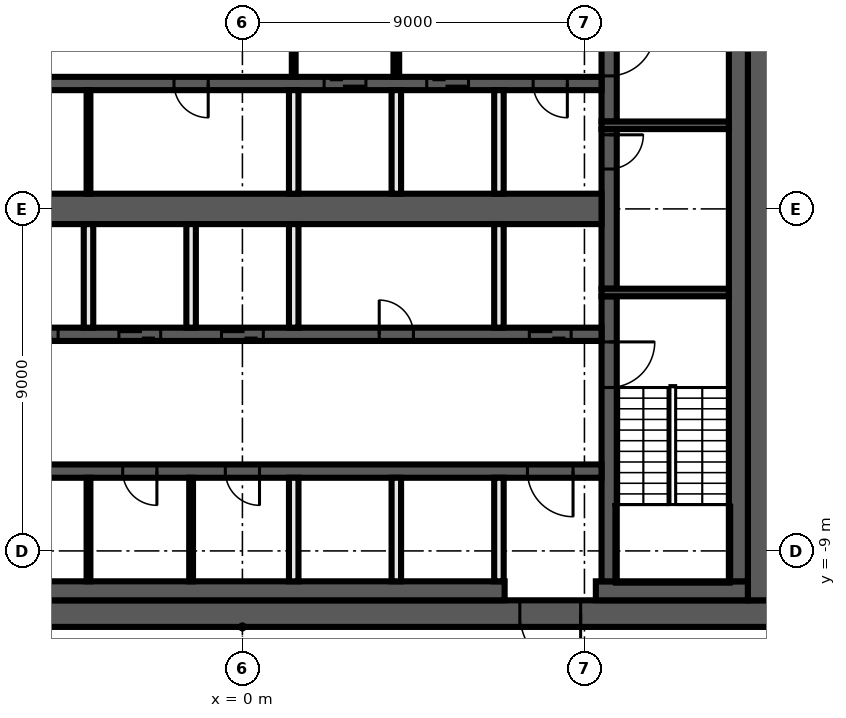
"""IFC4 building model, lengths in metres.
Left out: names, types, materials, properties, quantities, classifications, styles, units other than length and angle.
Written with IfcOpenShell. Run it as: python <this file> out.ifc"""

import sys

from ifc_helpers import new_model, si_unit, direction, frame, frame_2d, origin, place, context, subcontext, project, spatial, rectangle, extrude, element, fill, save


model = new_model("IFC4")
c1 = context("Model", 3, precision=1e-05, world=origin(), true_north=direction((0.0, 1.0)))
c2 = subcontext(c1, "Body", "Model", "MODEL_VIEW")
j1 = project(units=[si_unit("LENGTHUNIT", "METRE"), si_unit("PLANEANGLEUNIT", "RADIAN")], contexts=[c1])
p1 = place(None, origin())
s1 = spatial("IfcSite", under=j1, at=p1, CompositionType="ELEMENT")
p2 = place(p1, origin())
s2 = spatial("IfcBuilding", under=s1, at=p2, CompositionType="ELEMENT")
p3 = place(p2, frame((0.0, 0.0, 249.6)))
s3 = spatial("IfcBuildingStorey", under=s2, at=p3, CompositionType="ELEMENT", Elevation=249.6)
p4 = place(p3, frame((14.0, -10.65, 0.0), z_axis=(0.0, 0.0, 1.0), x_axis=(-1.0, 0.0, 0.0)))
e1 = element("IfcWall", 1, at=p4, inside=s3, PredefinedType="SHEAR", context=c2, shape_type="SweptSolid", body=[
    extrude(rectangle(XDim=28.0, YDim=0.7, at=frame_2d((14.0, 0.0))), origin(), (0.0, 0.0, 1.0), 3.82),
])
p5 = place(p4, frame((5.1, 0.0, 0.0)))
e2 = element("IfcOpeningElement", 2, at=p5, cuts=e1, PredefinedType="OPENING", context=c2, shape_type="SweptSolid", body=[
    extrude(rectangle(XDim=1.6, YDim=2.1, at=frame_2d((0.8, 1.05))), frame((0.0, 0.36, 0.0), z_axis=(0.0, -1.0, 0.0), x_axis=(1.0, 0.0, 0.0)), (0.0, 0.0, 1.0), 0.72),
])
p6 = place(p3, frame((13.65, 10.3, 0.0), z_axis=(0.0, 0.0, 1.0), x_axis=(0.0, -1.0, 0.0)))
e3 = element("IfcWall", 3, at=p6, inside=s3, PredefinedType="SHEAR", context=c2, shape_type="SweptSolid", body=[
    extrude(rectangle(XDim=20.6, YDim=0.7, at=frame_2d((10.3, 0.0))), origin(), (0.0, 0.0, 1.0), 3.82),
])
p7 = place(p3, frame((13.3, -10.05, 0.0), z_axis=(0.0, 0.0, 1.0), x_axis=(-1.0, 0.0, 0.0)))
e4 = element("IfcWall", 4, at=p7, inside=s3, PredefinedType="SHEAR", context=c2, shape_type="SweptSolid", body=[
    extrude(rectangle(XDim=4.0, YDim=0.5, at=frame_2d((2.0, 0.0))), origin(), (0.0, 0.0, 1.0), 3.82),
])
p8 = place(p3, frame((6.9, -10.05, 0.0), z_axis=(0.0, 0.0, 1.0), x_axis=(-1.0, 0.0, 0.0)))
e5 = element("IfcWall", 5, at=p8, inside=s3, PredefinedType="SHEAR", context=c2, shape_type="SweptSolid", body=[
    extrude(rectangle(XDim=20.2, YDim=0.5, at=frame_2d((10.1, 0.0))), origin(), (0.0, 0.0, 1.0), 3.82),
])
p9 = place(p3, frame((13.05, 9.8, 0.0), z_axis=(0.0, 0.0, 1.0), x_axis=(0.0, -1.0, 0.0)))
e6 = element("IfcWall", 6, at=p9, inside=s3, PredefinedType="SHEAR", context=c2, shape_type="SweptSolid", body=[
    extrude(rectangle(XDim=19.6, YDim=0.5, at=frame_2d((9.8, 0.0))), origin(), (0.0, 0.0, 1.0), 3.82),
])
p10 = place(p3, frame((9.65, -2.3, 0.0), z_axis=(0.0, 0.0, 1.0), x_axis=(0.0, -1.0, 0.0)))
e7 = element("IfcWall", 7, at=p10, inside=s3, PredefinedType="SHEAR", context=c2, shape_type="SweptSolid", body=[
    extrude(rectangle(XDim=7.5, YDim=0.4, at=frame_2d((3.75, 0.0))), origin(), (0.0, 0.0, 1.0), 3.82),
])
p11 = place(p10, frame((1.2, 0.0, 0.0)))
e8 = element("IfcOpeningElement", 8, at=p11, cuts=e7, PredefinedType="OPENING", context=c2, shape_type="SweptSolid", body=[
    extrude(rectangle(XDim=1.2, YDim=2.1, at=frame_2d((0.6, 1.05))), frame((0.0, 0.21, 0.0), z_axis=(0.0, -1.0, 0.0), x_axis=(1.0, 0.0, 0.0)), (0.0, 0.0, 1.0), 0.42),
])
p12 = place(p3, frame((9.65, 2.1, 0.0), z_axis=(0.0, 0.0, 1.0), x_axis=(0.0, -1.0, 0.0)))
e9 = element("IfcWall", 9, at=p12, inside=s3, PredefinedType="SHEAR", context=c2, shape_type="SweptSolid", body=[
    extrude(rectangle(XDim=4.2, YDim=0.4, at=frame_2d((2.1, 0.0))), origin(), (0.0, 0.0, 1.0), 3.82),
])
p13 = place(p12, frame((0.15, 0.0, 0.0)))
e10 = element("IfcOpeningElement", 10, at=p13, cuts=e9, PredefinedType="OPENING", context=c2, shape_type="SweptSolid", body=[
    extrude(rectangle(XDim=0.9, YDim=2.1, at=frame_2d((0.45, 1.05))), frame((0.0, 0.21, 0.0), z_axis=(0.0, -1.0, 0.0), x_axis=(1.0, 0.0, 0.0)), (0.0, 0.0, 1.0), 0.42),
])
p14 = place(p3, frame((9.65, 9.8, 0.0), z_axis=(0.0, 0.0, 1.0), x_axis=(0.0, -1.0, 0.0)))
e11 = element("IfcWall", 11, at=p14, inside=s3, PredefinedType="SHEAR", context=c2, shape_type="SweptSolid", body=[
    extrude(rectangle(XDim=7.5, YDim=0.4, at=frame_2d((3.75, 0.0))), origin(), (0.0, 0.0, 1.0), 3.82),
])
p15 = place(p14, frame((5.1, 0.0, 0.0)))
e12 = element("IfcOpeningElement", 12, at=p15, cuts=e11, PredefinedType="OPENING", context=c2, shape_type="SweptSolid", body=[
    extrude(rectangle(XDim=1.2, YDim=2.1, at=frame_2d((0.6, 1.05))), frame((0.0, 0.21, 0.0), z_axis=(0.0, -1.0, 0.0), x_axis=(1.0, 0.0, 0.0)), (0.0, 0.0, 1.0), 0.42),
])
for number, where, z_axis, x_axis in (
    (13, (9.45, 2.2, 0.0), (0.0, 0.0, 1.0), (1.0, 0.0, 0.0)),
    (14, (9.45, -2.2, 0.0), (0.0, 0.0, 1.0), (1.0, 0.0, 0.0)),
):
    element("IfcWall", number, at=place(p3, frame(where, z_axis=z_axis, x_axis=x_axis)), inside=s3, PredefinedType="SHEAR", context=c2, shape_type="SweptSolid", body=[
        extrude(rectangle(XDim=3.35, YDim=0.2, at=frame_2d((1.675, 0.0))), origin(), (0.0, 0.0, 1.0), 3.82),
    ])
p16 = place(p3, frame((9.45, 3.3, 0.0), z_axis=(0.0, 0.0, 1.0), x_axis=(-1.0, 0.0, 0.0)))
e15 = element("IfcWall", 15, at=p16, inside=s3, PredefinedType="SHEAR", context=c2, shape_type="SweptSolid", body=[
    extrude(rectangle(XDim=18.9, YDim=0.35, at=frame_2d((9.45, 0.0))), origin(), (0.0, 0.0, 1.0), 3.82),
])
p17 = place(p16, frame((6.2, 0.0, 0.0)))
e16 = element("IfcOpeningElement", 16, at=p17, cuts=e15, PredefinedType="OPENING", context=c2, shape_type="SweptSolid", body=[
    extrude(rectangle(XDim=1.1, YDim=2.1, at=frame_2d((0.55, 1.05))), frame((0.0, 0.185, 0.0), z_axis=(0.0, -1.0, 0.0), x_axis=(1.0, 0.0, 0.0)), (0.0, 0.0, 1.0), 0.37),
])
p18 = place(p16, frame((3.5, 0.0, 0.0)))
e17 = element("IfcOpeningElement", 17, at=p18, cuts=e15, PredefinedType="OPENING", context=c2, shape_type="SweptSolid", body=[
    extrude(rectangle(XDim=1.1, YDim=2.1, at=frame_2d((0.55, 1.05))), frame((0.0, 0.185, 0.0), z_axis=(0.0, -1.0, 0.0), x_axis=(1.0, 0.0, 0.0)), (0.0, 0.0, 1.0), 0.37),
])
p19 = place(p16, frame((0.9, 0.0, 0.0)))
e18 = element("IfcOpeningElement", 18, at=p19, cuts=e15, PredefinedType="OPENING", context=c2, shape_type="SweptSolid", body=[
    extrude(rectangle(XDim=0.9, YDim=2.1, at=frame_2d((0.45, 1.05))), frame((0.0, 0.185, 0.0), z_axis=(0.0, -1.0, 0.0), x_axis=(1.0, 0.0, 0.0)), (0.0, 0.0, 1.0), 0.37),
])
p20 = place(p16, frame((15.75, 0.0, 0.0)))
e19 = element("IfcOpeningElement", 19, at=p20, cuts=e15, PredefinedType="OPENING", context=c2, shape_type="SweptSolid", body=[
    extrude(rectangle(XDim=0.9, YDim=2.1, at=frame_2d((0.45, 1.05))), frame((0.0, 0.185, 0.0), z_axis=(0.0, -1.0, 0.0), x_axis=(1.0, 0.0, 0.0)), (0.0, 0.0, 1.0), 0.37),
])
p21 = place(p16, frame((10.35, 0.0, 0.0)))
e20 = element("IfcOpeningElement", 20, at=p21, cuts=e15, PredefinedType="OPENING", context=c2, shape_type="SweptSolid", body=[
    extrude(rectangle(XDim=0.9, YDim=2.1, at=frame_2d((0.45, 1.05))), frame((0.0, 0.185, 0.0), z_axis=(0.0, -1.0, 0.0), x_axis=(1.0, 0.0, 0.0)), (0.0, 0.0, 1.0), 0.37),
])
p22 = place(p3, frame((-9.45, -3.3, 0.0), z_axis=(0.0, 0.0, 1.0), x_axis=(1.0, 0.0, 0.0)))
e21 = element("IfcWall", 21, at=p22, inside=s3, PredefinedType="SHEAR", context=c2, shape_type="SweptSolid", body=[
    extrude(rectangle(XDim=18.9, YDim=0.35, at=frame_2d((9.45, 0.0))), origin(), (0.0, 0.0, 1.0), 3.82),
])
p23 = place(p22, frame((0.8, 0.0, 0.0)))
e22 = element("IfcOpeningElement", 22, at=p23, cuts=e21, PredefinedType="OPENING", context=c2, shape_type="SweptSolid", body=[
    extrude(rectangle(XDim=1.1, YDim=2.1, at=frame_2d((0.55, 1.05))), frame((0.0, 0.185, 0.0), z_axis=(0.0, -1.0, 0.0), x_axis=(1.0, 0.0, 0.0)), (0.0, 0.0, 1.0), 0.37),
])
p24 = place(p22, frame((3.5, 0.0, 0.0)))
e23 = element("IfcOpeningElement", 23, at=p24, cuts=e21, PredefinedType="OPENING", context=c2, shape_type="SweptSolid", body=[
    extrude(rectangle(XDim=1.1, YDim=2.1, at=frame_2d((0.55, 1.05))), frame((0.0, 0.185, 0.0), z_axis=(0.0, -1.0, 0.0), x_axis=(1.0, 0.0, 0.0)), (0.0, 0.0, 1.0), 0.37),
])
p25 = place(p22, frame((6.2, 0.0, 0.0)))
e24 = element("IfcOpeningElement", 24, at=p25, cuts=e21, PredefinedType="OPENING", context=c2, shape_type="SweptSolid", body=[
    extrude(rectangle(XDim=1.1, YDim=2.1, at=frame_2d((0.55, 1.05))), frame((0.0, 0.185, 0.0), z_axis=(0.0, -1.0, 0.0), x_axis=(1.0, 0.0, 0.0)), (0.0, 0.0, 1.0), 0.37),
])
p26 = place(p22, frame((8.9, 0.0, 0.0)))
e25 = element("IfcOpeningElement", 25, at=p26, cuts=e21, PredefinedType="OPENING", context=c2, shape_type="SweptSolid", body=[
    extrude(rectangle(XDim=1.1, YDim=2.1, at=frame_2d((0.55, 1.05))), frame((0.0, 0.185, 0.0), z_axis=(0.0, -1.0, 0.0), x_axis=(1.0, 0.0, 0.0)), (0.0, 0.0, 1.0), 0.37),
])
p27 = place(p22, frame((17.0, 0.0, 0.0)))
e26 = element("IfcOpeningElement", 26, at=p27, cuts=e21, PredefinedType="OPENING", context=c2, shape_type="SweptSolid", body=[
    extrude(rectangle(XDim=1.1, YDim=2.1, at=frame_2d((0.55, 1.05))), frame((0.0, 0.185, 0.0), z_axis=(0.0, -1.0, 0.0), x_axis=(1.0, 0.0, 0.0)), (0.0, 0.0, 1.0), 0.37),
])
p28 = place(p22, frame((13.05, 0.0, 0.0)))
e27 = element("IfcOpeningElement", 27, at=p28, cuts=e21, PredefinedType="OPENING", context=c2, shape_type="SweptSolid", body=[
    extrude(rectangle(XDim=0.9, YDim=2.1, at=frame_2d((0.45, 1.05))), frame((0.0, 0.185, 0.0), z_axis=(0.0, -1.0, 0.0), x_axis=(1.0, 0.0, 0.0)), (0.0, 0.0, 1.0), 0.37),
])
p29 = place(p3, frame((9.45, -6.9, 0.0), z_axis=(0.0, 0.0, 1.0), x_axis=(-1.0, 0.0, 0.0)))
e28 = element("IfcWall", 28, at=p29, inside=s3, PredefinedType="SHEAR", context=c2, shape_type="SweptSolid", body=[
    extrude(rectangle(XDim=18.9, YDim=0.35, at=frame_2d((9.45, 0.0))), origin(), (0.0, 0.0, 1.0), 3.82),
])
p30 = place(p29, frame((0.75, 0.0, 0.0)))
e29 = element("IfcOpeningElement", 29, at=p30, cuts=e28, PredefinedType="OPENING", context=c2, shape_type="SweptSolid", body=[
    extrude(rectangle(XDim=1.2, YDim=2.1, at=frame_2d((0.6, 1.05))), frame((0.0, 0.185, 0.0), z_axis=(0.0, -1.0, 0.0), x_axis=(1.0, 0.0, 0.0)), (0.0, 0.0, 1.0), 0.37),
])
p31 = place(p29, frame((15.75, 0.0, 0.0)))
e30 = element("IfcOpeningElement", 30, at=p31, cuts=e28, PredefinedType="OPENING", context=c2, shape_type="SweptSolid", body=[
    extrude(rectangle(XDim=0.9, YDim=2.1, at=frame_2d((0.45, 1.05))), frame((0.0, 0.185, 0.0), z_axis=(0.0, -1.0, 0.0), x_axis=(1.0, 0.0, 0.0)), (0.0, 0.0, 1.0), 0.37),
])
p32 = place(p29, frame((11.7, 0.0, 0.0)))
e31 = element("IfcOpeningElement", 31, at=p32, cuts=e28, PredefinedType="OPENING", context=c2, shape_type="SweptSolid", body=[
    extrude(rectangle(XDim=0.9, YDim=2.1, at=frame_2d((0.45, 1.05))), frame((0.0, 0.185, 0.0), z_axis=(0.0, -1.0, 0.0), x_axis=(1.0, 0.0, 0.0)), (0.0, 0.0, 1.0), 0.37),
])
p33 = place(p29, frame((9.0, 0.0, 0.0)))
e32 = element("IfcOpeningElement", 32, at=p33, cuts=e28, PredefinedType="OPENING", context=c2, shape_type="SweptSolid", body=[
    extrude(rectangle(XDim=0.9, YDim=2.1, at=frame_2d((0.45, 1.05))), frame((0.0, 0.185, 0.0), z_axis=(0.0, -1.0, 0.0), x_axis=(1.0, 0.0, 0.0)), (0.0, 0.0, 1.0), 0.37),
])
p34 = place(p3, frame((-9.45, 0.0, 0.0), z_axis=(0.0, 0.0, 1.0), x_axis=(1.0, 0.0, 0.0)))
e33 = element("IfcWall", 33, at=p34, inside=s3, PredefinedType="SHEAR", context=c2, shape_type="SweptSolid", body=[
    extrude(rectangle(XDim=18.9, YDim=0.8, at=frame_2d((9.45, 0.0))), origin(), (0.0, 0.0, 1.0), 3.82),
])
for number, where, z_axis, x_axis in (
    (34, (6.75, -9.8, 0.0), (0.0, 0.0, 1.0), (0.0, 1.0, 0.0)),
    (35, (6.75, -3.125, 0.0), (0.0, 0.0, 1.0), (0.0, 1.0, 0.0)),
    (36, (6.75, 0.4, 0.0), (0.0, 0.0, 1.0), (0.0, 1.0, 0.0)),
):
    element("IfcWall", number, at=place(p3, frame(where, z_axis=z_axis, x_axis=x_axis)), inside=s3, PredefinedType="SOLIDWALL", context=c2, shape_type="SweptSolid", body=[
        extrude(rectangle(XDim=2.725, YDim=0.25, at=frame_2d((1.363, 0.0))), origin(), (0.0, 0.0, 1.0), 3.82),
    ])
p35 = place(p3, frame((4.05, 6.725, 0.0), z_axis=(0.0, 0.0, 1.0), x_axis=(0.0, -1.0, 0.0)))
e37 = element("IfcWall", 37, at=p35, inside=s3, PredefinedType="PARTITIONING", context=c2, shape_type="SweptSolid", body=[
    extrude(rectangle(XDim=3.25, YDim=0.15, at=frame_2d((1.625, 0.0))), origin(), (0.0, 0.0, 1.0), 3.82),
])
p36 = place(p35, frame((1.025, 0.0, 0.0)))
e38 = element("IfcOpeningElement", 38, at=p36, cuts=e37, PredefinedType="OPENING", context=c2, shape_type="SweptSolid", body=[
    extrude(rectangle(XDim=1.2, YDim=2.1, at=frame_2d((0.6, 1.05))), frame((0.0, 0.085, 0.0), z_axis=(0.0, -1.0, 0.0), x_axis=(1.0, 0.0, 0.0)), (0.0, 0.0, 1.0), 0.17),
])
for number, where, z_axis, x_axis in (
    (39, (4.05, -9.8, 0.0), (0.0, 0.0, 1.0), (0.0, 1.0, 0.0)),
    (40, (4.05, 0.4, 0.0), (0.0, 0.0, 1.0), (0.0, 1.0, 0.0)),
):
    element("IfcWall", number, at=place(p3, frame(where, z_axis=z_axis, x_axis=x_axis)), inside=s3, PredefinedType="SOLIDWALL", context=c2, shape_type="SweptSolid", body=[
        extrude(rectangle(XDim=2.725, YDim=0.25, at=frame_2d((1.363, 0.0))), origin(), (0.0, 0.0, 1.0), 3.82),
    ])
p37 = place(p3, frame((1.35, 6.725, 0.0), z_axis=(0.0, 0.0, 1.0), x_axis=(0.0, -1.0, 0.0)))
e41 = element("IfcWall", 41, at=p37, inside=s3, PredefinedType="PARTITIONING", context=c2, shape_type="SweptSolid", body=[
    extrude(rectangle(XDim=3.25, YDim=0.1, at=frame_2d((1.625, 0.0))), origin(), (0.0, 0.0, 1.0), 3.82),
])
p38 = place(p37, frame((1.025, 0.0, 0.0)))
e42 = element("IfcOpeningElement", 42, at=p38, cuts=e41, PredefinedType="OPENING", context=c2, shape_type="SweptSolid", body=[
    extrude(rectangle(XDim=1.2, YDim=2.1, at=frame_2d((0.6, 1.05))), frame((0.0, 0.06, 0.0), z_axis=(0.0, -1.0, 0.0), x_axis=(1.0, 0.0, 0.0)), (0.0, 0.0, 1.0), 0.12),
])
for number, where, z_axis, x_axis in (
    (43, (1.35, -9.8, 0.0), (0.0, 0.0, 1.0), (0.0, 1.0, 0.0)),
    (44, (1.35, -3.125, 0.0), (0.0, 0.0, 1.0), (0.0, 1.0, 0.0)),
    (45, (1.35, 0.4, 0.0), (0.0, 0.0, 1.0), (0.0, 1.0, 0.0)),
):
    element("IfcWall", number, at=place(p3, frame(where, z_axis=z_axis, x_axis=x_axis)), inside=s3, PredefinedType="SOLIDWALL", context=c2, shape_type="SweptSolid", body=[
        extrude(rectangle(XDim=2.725, YDim=0.25, at=frame_2d((1.363, 0.0))), origin(), (0.0, 0.0, 1.0), 3.82),
    ])
p39 = place(p3, frame((-1.35, -9.8, 0.0), z_axis=(0.0, 0.0, 1.0), x_axis=(0.0, 1.0, 0.0)))
e46 = element("IfcWall", 46, at=p39, inside=s3, PredefinedType="PARTITIONING", context=c2, shape_type="SweptSolid", body=[
    extrude(rectangle(XDim=2.725, YDim=0.1, at=frame_2d((1.363, 0.0))), origin(), (0.0, 0.0, 1.0), 3.82),
])
p40 = place(p3, frame((-1.35, -3.125, 0.0), z_axis=(0.0, 0.0, 1.0), x_axis=(0.0, 1.0, 0.0)))
e47 = element("IfcWall", 47, at=p40, inside=s3, PredefinedType="SOLIDWALL", context=c2, shape_type="SweptSolid", body=[
    extrude(rectangle(XDim=2.725, YDim=0.25, at=frame_2d((1.363, 0.0))), origin(), (0.0, 0.0, 1.0), 3.82),
])
for number, where, z_axis, x_axis in (
    (48, (-4.05, -9.8, 0.0), (0.0, 0.0, 1.0), (0.0, 1.0, 0.0)),
    (49, (-4.05, 0.4, 0.0), (0.0, 0.0, 1.0), (0.0, 1.0, 0.0)),
):
    element("IfcWall", number, at=place(p3, frame(where, z_axis=z_axis, x_axis=x_axis)), inside=s3, PredefinedType="PARTITIONING", context=c2, shape_type="SweptSolid", body=[
        extrude(rectangle(XDim=2.725, YDim=0.1, at=frame_2d((1.363, 0.0))), origin(), (0.0, 0.0, 1.0), 3.82),
    ])
p41 = place(p3, frame((-4.05, -3.125, 0.0), z_axis=(0.0, 0.0, 1.0), x_axis=(0.0, 1.0, 0.0)))
e50 = element("IfcWall", 50, at=p41, inside=s3, PredefinedType="SOLIDWALL", context=c2, shape_type="SweptSolid", body=[
    extrude(rectangle(XDim=2.725, YDim=0.25, at=frame_2d((1.363, 0.0))), origin(), (0.0, 0.0, 1.0), 3.82),
])
p42 = place(p13, origin())
e51 = element("IfcDoor", 51, at=p42, inside=s3, OperationType="SINGLE_SWING_RIGHT", PredefinedType="DOOR", context=c2, shape_type="SweptSolid", body=[
    extrude(rectangle(XDim=0.9, YDim=2.1, at=frame_2d((0.45, 1.05))), frame((0.0, 0.025, 0.0), z_axis=(0.0, -1.0, 0.0), x_axis=(1.0, 0.0, 0.0)), (0.0, 0.0, 1.0), 0.05),
])
fill(e10, e51)
p43 = place(p17, origin())
e52 = element("IfcDoor", 52, at=p43, inside=s3, OperationType="DOUBLE_DOOR_SLIDING", PredefinedType="DOOR", context=c2, shape_type="SweptSolid", body=[
    extrude(rectangle(XDim=1.1, YDim=2.1, at=frame_2d((0.55, 1.05))), frame((0.0, 0.025, 0.0), z_axis=(0.0, -1.0, 0.0), x_axis=(1.0, 0.0, 0.0)), (0.0, 0.0, 1.0), 0.05),
])
fill(e16, e52)
p44 = place(p18, origin())
e53 = element("IfcDoor", 53, at=p44, inside=s3, OperationType="DOUBLE_DOOR_SLIDING", PredefinedType="DOOR", context=c2, shape_type="SweptSolid", body=[
    extrude(rectangle(XDim=1.1, YDim=2.1, at=frame_2d((0.55, 1.05))), frame((0.0, 0.025, 0.0), z_axis=(0.0, -1.0, 0.0), x_axis=(1.0, 0.0, 0.0)), (0.0, 0.0, 1.0), 0.05),
])
fill(e17, e53)
p45 = place(p19, origin())
e54 = element("IfcDoor", 54, at=p45, inside=s3, OperationType="SINGLE_SWING_LEFT", PredefinedType="DOOR", context=c2, shape_type="SweptSolid", body=[
    extrude(rectangle(XDim=0.9, YDim=2.1, at=frame_2d((0.45, 1.05))), frame((0.0, 0.025, 0.0), z_axis=(0.0, -1.0, 0.0), x_axis=(1.0, 0.0, 0.0)), (0.0, 0.0, 1.0), 0.05),
])
fill(e18, e54)
p46 = place(p24, origin())
e55 = element("IfcDoor", 55, at=p46, inside=s3, OperationType="DOUBLE_DOOR_SLIDING", PredefinedType="DOOR", context=c2, shape_type="SweptSolid", body=[
    extrude(rectangle(XDim=1.1, YDim=2.1, at=frame_2d((0.55, 1.05))), frame((0.0, 0.025, 0.0), z_axis=(0.0, -1.0, 0.0), x_axis=(1.0, 0.0, 0.0)), (0.0, 0.0, 1.0), 0.05),
])
fill(e23, e55)
p47 = place(p25, origin())
e56 = element("IfcDoor", 56, at=p47, inside=s3, OperationType="DOUBLE_DOOR_SLIDING", PredefinedType="DOOR", context=c2, shape_type="SweptSolid", body=[
    extrude(rectangle(XDim=1.1, YDim=2.1, at=frame_2d((0.55, 1.05))), frame((0.0, 0.025, 0.0), z_axis=(0.0, -1.0, 0.0), x_axis=(1.0, 0.0, 0.0)), (0.0, 0.0, 1.0), 0.05),
])
fill(e24, e56)
p48 = place(p26, origin())
e57 = element("IfcDoor", 57, at=p48, inside=s3, OperationType="DOUBLE_DOOR_SLIDING", PredefinedType="DOOR", context=c2, shape_type="SweptSolid", body=[
    extrude(rectangle(XDim=1.1, YDim=2.1, at=frame_2d((0.55, 1.05))), frame((0.0, 0.025, 0.0), z_axis=(0.0, -1.0, 0.0), x_axis=(1.0, 0.0, 0.0)), (0.0, 0.0, 1.0), 0.05),
])
fill(e25, e57)
p49 = place(p27, origin())
e58 = element("IfcDoor", 58, at=p49, inside=s3, OperationType="DOUBLE_DOOR_SLIDING", PredefinedType="DOOR", context=c2, shape_type="SweptSolid", body=[
    extrude(rectangle(XDim=1.1, YDim=2.1, at=frame_2d((0.55, 1.05))), frame((0.0, 0.025, 0.0), z_axis=(0.0, -1.0, 0.0), x_axis=(1.0, 0.0, 0.0)), (0.0, 0.0, 1.0), 0.05),
])
fill(e26, e58)
p50 = place(p5, origin())
e59 = element("IfcDoor", 59, at=p50, inside=s3, OperationType="DOUBLE_DOOR_SINGLE_SWING", PredefinedType="DOOR", context=c2, shape_type="SweptSolid", body=[
    extrude(rectangle(XDim=1.6, YDim=2.1, at=frame_2d((0.8, 1.05))), frame((0.0, 0.025, 0.0), z_axis=(0.0, -1.0, 0.0), x_axis=(1.0, 0.0, 0.0)), (0.0, 0.0, 1.0), 0.05),
])
fill(e2, e59)
p51 = place(p30, origin())
e60 = element("IfcDoor", 60, at=p51, inside=s3, OperationType="SINGLE_SWING_LEFT", PredefinedType="DOOR", context=c2, shape_type="SweptSolid", body=[
    extrude(rectangle(XDim=1.2, YDim=2.1, at=frame_2d((0.6, 1.05))), frame((0.0, 0.025, 0.0), z_axis=(0.0, -1.0, 0.0), x_axis=(1.0, 0.0, 0.0)), (0.0, 0.0, 1.0), 0.05),
])
fill(e29, e60)
p52 = place(p21, origin())
e61 = element("IfcDoor", 61, at=p52, inside=s3, OperationType="SINGLE_SWING_LEFT", PredefinedType="DOOR", context=c2, shape_type="SweptSolid", body=[
    extrude(rectangle(XDim=0.9, YDim=2.1, at=frame_2d((0.45, 1.05))), frame((0.0, 0.025, 0.0), z_axis=(0.0, -1.0, 0.0), x_axis=(1.0, 0.0, 0.0)), (0.0, 0.0, 1.0), 0.05),
])
fill(e20, e61)
p53 = place(p28, origin())
e62 = element("IfcDoor", 62, at=p53, inside=s3, OperationType="SINGLE_SWING_RIGHT", PredefinedType="DOOR", context=c2, shape_type="SweptSolid", body=[
    extrude(rectangle(XDim=0.9, YDim=2.1, at=frame_2d((0.45, 1.05))), frame((0.0, 0.025, 0.0), z_axis=(0.0, -1.0, 0.0), x_axis=(1.0, 0.0, 0.0)), (0.0, 0.0, 1.0), 0.05),
])
fill(e27, e62)
p54 = place(p32, origin())
e63 = element("IfcDoor", 63, at=p54, inside=s3, OperationType="SINGLE_SWING_RIGHT", PredefinedType="DOOR", context=c2, shape_type="SweptSolid", body=[
    extrude(rectangle(XDim=0.9, YDim=2.1, at=frame_2d((0.45, 1.05))), frame((0.0, 0.025, 0.0), z_axis=(0.0, -1.0, 0.0), x_axis=(1.0, 0.0, 0.0)), (0.0, 0.0, 1.0), 0.05),
])
fill(e31, e63)
p55 = place(p33, origin())
e64 = element("IfcDoor", 64, at=p55, inside=s3, OperationType="SINGLE_SWING_LEFT", PredefinedType="DOOR", context=c2, shape_type="SweptSolid", body=[
    extrude(rectangle(XDim=0.9, YDim=2.1, at=frame_2d((0.45, 1.05))), frame((0.0, 0.025, 0.0), z_axis=(0.0, -1.0, 0.0), x_axis=(1.0, 0.0, 0.0)), (0.0, 0.0, 1.0), 0.05),
])
fill(e32, e64)
p56 = place(p15, origin())
e65 = element("IfcDoor", 65, at=p56, inside=s3, OperationType="SINGLE_SWING_LEFT", PredefinedType="DOOR", context=c2, shape_type="SweptSolid", body=[
    extrude(rectangle(XDim=1.2, YDim=2.1, at=frame_2d((0.6, 1.05))), frame((0.0, 0.025, 0.0), z_axis=(0.0, -1.0, 0.0), x_axis=(1.0, 0.0, 0.0)), (0.0, 0.0, 1.0), 0.05),
])
fill(e12, e65)
p57 = place(p11, origin())
e66 = element("IfcDoor", 66, at=p57, inside=s3, OperationType="SINGLE_SWING_RIGHT", PredefinedType="DOOR", context=c2, shape_type="SweptSolid", body=[
    extrude(rectangle(XDim=1.2, YDim=2.1, at=frame_2d((0.6, 1.05))), frame((0.0, 0.025, 0.0), z_axis=(0.0, -1.0, 0.0), x_axis=(1.0, 0.0, 0.0)), (0.0, 0.0, 1.0), 0.05),
])
fill(e8, e66)
save(model, sys.argv[1])
